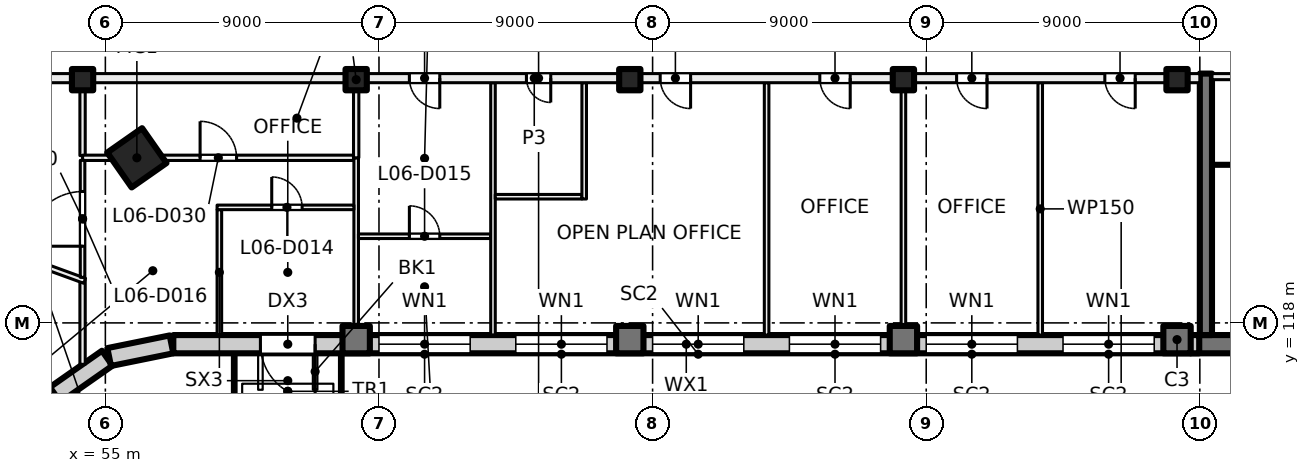
"""IFC4 building model, lengths in metres.
Left out: names, types, materials, properties, quantities, classifications, styles, units other than length and angle.
Written with IfcOpenShell. Run it as: python <this file> out.ifc"""

import sys

from ifc_helpers import new_model, si_unit, direction, frame, frame_2d, origin, origin_2d, place, context, subcontext, project, spatial, rectangle, hollow_rectangle, extrude, element, fill, save


model = new_model("IFC4")
c1 = context("Model", 3, precision=1e-05, world=origin(), true_north=direction((0.0, 1.0)))
c2 = subcontext(c1, "Body", "Model", "MODEL_VIEW")
j1 = project(units=[si_unit("LENGTHUNIT", "METRE"), si_unit("PLANEANGLEUNIT", "RADIAN")], contexts=[c1])
p1 = place(None, origin())
s1 = spatial("IfcSite", under=j1, at=p1, CompositionType="ELEMENT")
p2 = place(p1, origin())
s2 = spatial("IfcBuilding", under=s1, at=p2, CompositionType="ELEMENT")
p3 = place(p2, frame((0.0, 0.0, 31.5)))
s3 = spatial("IfcBuildingStorey", under=s2, at=p3, CompositionType="ELEMENT", Elevation=31.5)
p4 = place(p3, frame((56.036, 123.43, 0.0), z_axis=(0.0, 0.0, 1.0), x_axis=(0.573576436351, -0.819152044289, 0.0)))
e1 = element("IfcColumn", 1, at=p4, inside=s3, PredefinedType="COLUMN", context=c2, shape_type="SweptSolid", body=[
    extrude(hollow_rectangle(XDim=1.4, YDim=1.4, WallThickness=0.04, at=origin_2d()), origin(), (0.0, 0.0, 1.0), 4.0),
])
for number, where, z_axis, x_axis in (
    (2, (54.25, 126.0, 0.0), (0.0, 0.0, 1.0), (1.0, 0.0, 0.0)),
    (3, (63.25, 126.0, 0.0), (0.0, 0.0, 1.0), (1.0, 0.0, 0.0)),
    (4, (72.25, 126.0, 0.0), (0.0, 0.0, 1.0), (1.0, 0.0, 0.0)),
    (5, (81.25, 126.0, 0.0), (0.0, 0.0, 1.0), (1.0, 0.0, 0.0)),
    (6, (90.25, 126.0, 0.0), (0.0, 0.0, 1.0), (1.0, 0.0, 0.0)),
):
    element("IfcColumn", number, at=place(p3, frame(where, z_axis=z_axis, x_axis=x_axis)), inside=s3, PredefinedType="COLUMN", context=c2, shape_type="SweptSolid", body=[
        extrude(rectangle(XDim=0.7, YDim=0.7, at=origin_2d()), origin(), (0.0, 0.0, 1.0), 4.0),
    ])
for number, where, z_axis, x_axis in (
    (7, (63.25, 117.45, 0.0), (0.0, 0.0, 1.0), (1.0, 0.0, 0.0)),
    (8, (72.25, 117.45, 0.0), (0.0, 0.0, 1.0), (1.0, 0.0, 0.0)),
    (9, (81.25, 117.45, 0.0), (0.0, 0.0, 1.0), (1.0, 0.0, 0.0)),
    (10, (90.25, 117.45, 0.0), (0.0, 0.0, 1.0), (1.0, 0.0, 0.0)),
):
    element("IfcColumn", number, at=place(p3, frame(where, z_axis=z_axis, x_axis=x_axis)), inside=s3, PredefinedType="COLUMN", context=c2, shape_type="SweptSolid", body=[
        extrude(rectangle(XDim=0.9, YDim=0.9, at=origin_2d()), origin(), (0.0, 0.0, 1.0), 4.0),
    ])
p5 = place(p3, frame((99.6, 117.3, 0.0), z_axis=(0.0, 0.0, 1.0), x_axis=(-1.0, 0.0, 0.0)))
e11 = element("IfcWall", 11, at=p5, inside=s3, PredefinedType="SHEAR", context=c2, shape_type="SweptSolid", body=[
    extrude(rectangle(XDim=8.9, YDim=0.6, at=frame_2d((4.45, 0.0))), origin(), (0.0, 0.0, 1.0), 4.0),
])
p6 = place(p3, frame((91.2, 126.2, 0.0), z_axis=(0.0, 0.0, 1.0), x_axis=(0.0, -1.0, 0.0)))
e12 = element("IfcWall", 12, at=p6, inside=s3, PredefinedType="SHEAR", context=c2, shape_type="SweptSolid", body=[
    extrude(rectangle(XDim=8.6, YDim=0.4, at=frame_2d((4.3, 0.0))), origin(), (0.0, 0.0, 1.0), 4.0),
])
p7 = place(p3, frame((53.305, 115.578, 0.0), z_axis=(0.0, 0.0, 1.0), x_axis=(-0.522402266438, -0.852699168535, 0.0)))
e13 = element("IfcWall", 13, at=p7, inside=s3, PredefinedType="SOLIDWALL", context=c2, shape_type="SweptSolid", body=[
    extrude(rectangle(XDim=2.042, YDim=0.6, at=frame_2d((1.021, 0.0))), origin(), (0.0, 0.0, 1.0), 3.625),
])
for number, where, z_axis, x_axis in (
    (14, (55.062, 116.839, 0.0), (0.0, 0.0, 1.0), (-0.819, -0.574, 0.0)),
    (15, (57.175, 117.294, 0.0), (0.0, 0.0, 1.0), (-0.98, -0.199, 0.0)),
):
    element("IfcWall", number, at=place(p3, frame(where, z_axis=z_axis, x_axis=x_axis)), inside=s3, PredefinedType="SOLIDWALL", context=c2, shape_type="SweptSolid", body=[
        extrude(rectangle(XDim=2.092, YDim=0.6, at=frame_2d((1.046, 0.0))), origin(), (0.0, 0.0, 1.0), 3.625),
    ])
p8 = place(p3, frame((90.98, 117.3, 0.0), z_axis=(0.0, 0.0, 1.0), x_axis=(-1.0, 0.0, 0.0)))
e16 = element("IfcWall", 16, at=p8, inside=s3, PredefinedType="SOLIDWALL", context=c2, shape_type="SweptSolid", body=[
    extrude(rectangle(XDim=33.745, YDim=0.6, at=frame_2d((16.873, 0.0))), origin(), (0.0, 0.0, 1.0), 3.625),
])
p9 = place(p8, frame((1.48, 0.0, 0.9)))
e17 = element("IfcOpeningElement", 17, at=p9, cuts=e16, PredefinedType="OPENING", context=c2, shape_type="SweptSolid", body=[
    extrude(rectangle(XDim=3.0, YDim=2.4, at=frame_2d((1.5, 1.2))), frame((0.0, 0.31, 0.0), z_axis=(0.0, -1.0, 0.0), x_axis=(1.0, 0.0, 0.0)), (0.0, 0.0, 1.0), 0.62),
])
p10 = place(p8, frame((5.98, 0.0, 0.9)))
e18 = element("IfcOpeningElement", 18, at=p10, cuts=e16, PredefinedType="OPENING", context=c2, shape_type="SweptSolid", body=[
    extrude(rectangle(XDim=3.0, YDim=2.4, at=frame_2d((1.5, 1.2))), frame((0.0, 0.31, 0.0), z_axis=(0.0, -1.0, 0.0), x_axis=(1.0, 0.0, 0.0)), (0.0, 0.0, 1.0), 0.62),
])
p11 = place(p8, frame((10.48, 0.0, 0.9)))
e19 = element("IfcOpeningElement", 19, at=p11, cuts=e16, PredefinedType="OPENING", context=c2, shape_type="SweptSolid", body=[
    extrude(rectangle(XDim=3.0, YDim=2.4, at=frame_2d((1.5, 1.2))), frame((0.0, 0.31, 0.0), z_axis=(0.0, -1.0, 0.0), x_axis=(1.0, 0.0, 0.0)), (0.0, 0.0, 1.0), 0.62),
])
p12 = place(p8, frame((14.98, 0.0, 0.9)))
e20 = element("IfcOpeningElement", 20, at=p12, cuts=e16, PredefinedType="OPENING", context=c2, shape_type="SweptSolid", body=[
    extrude(rectangle(XDim=3.0, YDim=2.4, at=frame_2d((1.5, 1.2))), frame((0.0, 0.31, 0.0), z_axis=(0.0, -1.0, 0.0), x_axis=(1.0, 0.0, 0.0)), (0.0, 0.0, 1.0), 0.62),
])
p13 = place(p8, frame((19.48, 0.0, 0.9)))
e21 = element("IfcOpeningElement", 21, at=p13, cuts=e16, PredefinedType="OPENING", context=c2, shape_type="SweptSolid", body=[
    extrude(rectangle(XDim=3.0, YDim=2.4, at=frame_2d((1.5, 1.2))), frame((0.0, 0.31, 0.0), z_axis=(0.0, -1.0, 0.0), x_axis=(1.0, 0.0, 0.0)), (0.0, 0.0, 1.0), 0.62),
])
p14 = place(p8, frame((23.98, 0.0, 0.9)))
e22 = element("IfcOpeningElement", 22, at=p14, cuts=e16, PredefinedType="OPENING", context=c2, shape_type="SweptSolid", body=[
    extrude(rectangle(XDim=3.0, YDim=2.4, at=frame_2d((1.5, 1.2))), frame((0.0, 0.31, 0.0), z_axis=(0.0, -1.0, 0.0), x_axis=(1.0, 0.0, 0.0)), (0.0, 0.0, 1.0), 0.62),
])
p15 = place(p8, frame((29.08, 0.0, 0.0)))
e23 = element("IfcOpeningElement", 23, at=p15, cuts=e16, PredefinedType="OPENING", context=c2, shape_type="SweptSolid", body=[
    extrude(rectangle(XDim=1.8, YDim=2.4, at=frame_2d((0.9, 1.2))), frame((0.0, 0.31, 0.0), z_axis=(0.0, -1.0, 0.0), x_axis=(1.0, 0.0, 0.0)), (0.0, 0.0, 1.0), 0.62),
])
p16 = place(p3, frame((95.2, 126.1, 0.0), z_axis=(0.0, 0.0, 1.0), x_axis=(-1.0, 0.0, 0.0)))
e24 = element("IfcWall", 24, at=p16, inside=s3, PredefinedType="PARTITIONING", context=c2, shape_type="SweptSolid", body=[
    extrude(rectangle(XDim=3.8, YDim=0.2, at=frame_2d((1.9, 0.0))), origin(), (0.0, 0.0, 1.0), 3.625),
])
p17 = place(p16, frame((0.3, 0.0, 0.0)))
e25 = element("IfcOpeningElement", 25, at=p17, cuts=e24, PredefinedType="OPENING", context=c2, shape_type="SweptSolid", body=[
    extrude(rectangle(XDim=1.2, YDim=2.1, at=frame_2d((0.6, 1.05))), frame((0.0, 0.11, 0.0), z_axis=(0.0, -1.0, 0.0), x_axis=(1.0, 0.0, 0.0)), (0.0, 0.0, 1.0), 0.22),
])
p18 = place(p3, frame((93.35, 123.2, 0.0), z_axis=(0.0, 0.0, 1.0), x_axis=(-1.0, 0.0, 0.0)))
e26 = element("IfcWall", 26, at=p18, inside=s3, PredefinedType="PARTITIONING", context=c2, shape_type="SweptSolid", body=[
    extrude(rectangle(XDim=1.95, YDim=0.1, at=frame_2d((0.975, 0.0))), origin(), (0.0, 0.0, 1.0), 3.625),
])
p19 = place(p3, frame((54.25, 116.637, 0.0), z_axis=(0.0, 0.0, 1.0), x_axis=(0.0, 1.0, 0.0)))
e27 = element("IfcWall", 27, at=p19, inside=s3, PredefinedType="PARTITIONING", context=c2, shape_type="SweptSolid", body=[
    extrude(rectangle(XDim=2.776, YDim=0.175, at=frame_2d((1.388, 0.0))), origin(), (0.0, 0.0, 1.0), 3.625),
])
p20 = place(p3, frame((54.32, 119.384, 0.0), z_axis=(0.0, 0.0, 1.0), x_axis=(-0.939632908118, 0.342184157994, 0.0)))
e28 = element("IfcWall", 28, at=p20, inside=s3, PredefinedType="PARTITIONING", context=c2, shape_type="SweptSolid", body=[
    extrude(rectangle(XDim=8.665, YDim=0.175, at=frame_2d((4.333, 0.0))), origin(), (0.0, 0.0, 1.0), 3.625),
])
p21 = place(p3, frame((54.25, 123.502, 0.0), z_axis=(0.0, 0.0, 1.0), x_axis=(0.0, 1.0, 0.0)))
e29 = element("IfcWall", 29, at=p21, inside=s3, PredefinedType="PARTITIONING", context=c2, shape_type="SweptSolid", body=[
    extrude(rectangle(XDim=2.398, YDim=0.175, at=frame_2d((1.199, 0.0))), origin(), (0.0, 0.0, 1.0), 3.625),
])
p22 = place(p3, frame((54.25, 123.43, 0.0), z_axis=(0.0, 0.0, 1.0), x_axis=(1.0, 0.0, 0.0)))
e30 = element("IfcWall", 30, at=p22, inside=s3, PredefinedType="PARTITIONING", context=c2, shape_type="SweptSolid", body=[
    extrude(rectangle(XDim=8.912, YDim=0.175, at=frame_2d((4.456, 0.0))), origin(), (0.0, 0.0, 1.0), 3.625),
])
p23 = place(p22, frame((3.866, 0.0, 0.0)))
e31 = element("IfcOpeningElement", 31, at=p23, cuts=e30, PredefinedType="OPENING", context=c2, shape_type="SweptSolid", body=[
    extrude(rectangle(XDim=1.2, YDim=2.1, at=frame_2d((0.6, 1.05))), frame((0.0, 0.097, 0.0), z_axis=(0.0, -1.0, 0.0), x_axis=(1.0, 0.0, 0.0)), (0.0, 0.0, 1.0), 0.195),
])
p24 = place(p3, frame((54.25, 119.498, 0.0), z_axis=(0.0, 0.0, 1.0), x_axis=(0.0, 1.0, 0.0)))
e32 = element("IfcWall", 32, at=p24, inside=s3, PredefinedType="PARTITIONING", context=c2, shape_type="SweptSolid", body=[
    extrude(rectangle(XDim=3.848, YDim=0.15, at=frame_2d((1.924, 0.0))), origin(), (0.0, 0.0, 1.0), 3.625),
])
p25 = place(p24, frame((1.024, 0.0, 0.0)))
e33 = element("IfcOpeningElement", 33, at=p25, cuts=e32, PredefinedType="OPENING", context=c2, shape_type="SweptSolid", body=[
    extrude(rectangle(XDim=1.8, YDim=2.1, at=frame_2d((0.9, 1.05))), frame((0.0, 0.085, 0.0), z_axis=(0.0, -1.0, 0.0), x_axis=(1.0, 0.0, 0.0)), (0.0, 0.0, 1.0), 0.17),
])
p26 = place(p3, frame((58.75, 117.6, 0.0), z_axis=(0.0, 0.0, 1.0), x_axis=(0.0, 1.0, 0.0)))
e34 = element("IfcWall", 34, at=p26, inside=s3, PredefinedType="PARTITIONING", context=c2, shape_type="SweptSolid", body=[
    extrude(rectangle(XDim=4.125, YDim=0.15, at=frame_2d((2.062, 0.0))), origin(), (0.0, 0.0, 1.0), 3.625),
])
p27 = place(p3, frame((63.25, 117.6, 0.0), z_axis=(0.0, 0.0, 1.0), x_axis=(0.0, 1.0, 0.0)))
e35 = element("IfcWall", 35, at=p27, inside=s3, PredefinedType="PARTITIONING", context=c2, shape_type="SweptSolid", body=[
    extrude(rectangle(XDim=5.83, YDim=0.15, at=frame_2d((2.915, 0.0))), origin(), (0.0, 0.0, 1.0), 3.625),
])
p28 = place(p3, frame((63.325, 120.85, 0.0), z_axis=(0.0, 0.0, 1.0), x_axis=(1.0, 0.0, 0.0)))
e36 = element("IfcWall", 36, at=p28, inside=s3, PredefinedType="PARTITIONING", context=c2, shape_type="SweptSolid", body=[
    extrude(rectangle(XDim=4.35, YDim=0.15, at=frame_2d((2.175, 0.0))), origin(), (0.0, 0.0, 1.0), 3.625),
])
p29 = place(p28, frame((1.675, 0.0, 0.0)))
e37 = element("IfcOpeningElement", 37, at=p29, cuts=e36, PredefinedType="OPENING", context=c2, shape_type="SweptSolid", body=[
    extrude(rectangle(XDim=1.0, YDim=2.1, at=frame_2d((0.5, 1.05))), frame((0.0, 0.085, 0.0), z_axis=(0.0, -1.0, 0.0), x_axis=(1.0, 0.0, 0.0)), (0.0, 0.0, 1.0), 0.17),
])
p30 = place(p3, frame((58.675, 121.8, 0.0), z_axis=(0.0, 0.0, 1.0), x_axis=(1.0, 0.0, 0.0)))
e38 = element("IfcWall", 38, at=p30, inside=s3, PredefinedType="PARTITIONING", context=c2, shape_type="SweptSolid", body=[
    extrude(rectangle(XDim=4.5, YDim=0.15, at=frame_2d((2.25, 0.0))), origin(), (0.0, 0.0, 1.0), 3.625),
])
p31 = place(p30, frame((1.798, 0.0, 0.0)))
e39 = element("IfcOpeningElement", 39, at=p31, cuts=e38, PredefinedType="OPENING", context=c2, shape_type="SweptSolid", body=[
    extrude(rectangle(XDim=1.0, YDim=2.1, at=frame_2d((0.5, 1.05))), frame((0.0, 0.085, 0.0), z_axis=(0.0, -1.0, 0.0), x_axis=(1.0, 0.0, 0.0)), (0.0, 0.0, 1.0), 0.17),
])
p32 = place(p3, frame((63.25, 123.43, 0.0), z_axis=(0.0, 0.0, 1.0), x_axis=(0.0, 1.0, 0.0)))
e40 = element("IfcWall", 40, at=p32, inside=s3, PredefinedType="PARTITIONING", context=c2, shape_type="SweptSolid", body=[
    extrude(rectangle(XDim=2.47, YDim=0.175, at=frame_2d((1.235, 0.0))), origin(), (0.0, 0.0, 1.0), 3.625),
])
p33 = place(p3, frame((67.75, 117.6, 0.0), z_axis=(0.0, 0.0, 1.0), x_axis=(0.0, 1.0, 0.0)))
e41 = element("IfcWall", 41, at=p33, inside=s3, PredefinedType="PARTITIONING", context=c2, shape_type="SweptSolid", body=[
    extrude(rectangle(XDim=8.3, YDim=0.15, at=frame_2d((4.15, 0.0))), origin(), (0.0, 0.0, 1.0), 3.625),
])
p34 = place(p3, frame((70.675, 122.15, 0.0), z_axis=(0.0, 0.0, 1.0), x_axis=(-1.0, 0.0, 0.0)))
e42 = element("IfcWall", 42, at=p34, inside=s3, PredefinedType="PARTITIONING", context=c2, shape_type="SweptSolid", body=[
    extrude(rectangle(XDim=2.85, YDim=0.15, at=frame_2d((1.425, 0.0))), origin(), (0.0, 0.0, 1.0), 3.625),
])
p35 = place(p3, frame((70.75, 125.9, 0.0), z_axis=(0.0, 0.0, 1.0), x_axis=(0.0, -1.0, 0.0)))
e43 = element("IfcWall", 43, at=p35, inside=s3, PredefinedType="PARTITIONING", context=c2, shape_type="SweptSolid", body=[
    extrude(rectangle(XDim=3.825, YDim=0.15, at=frame_2d((1.913, 0.0))), origin(), (0.0, 0.0, 1.0), 3.625),
])
for number, where, z_axis, x_axis in (
    (44, (76.75, 117.6, 0.0), (0.0, 0.0, 1.0), (0.0, 1.0, 0.0)),
    (45, (81.25, 117.6, 0.0), (0.0, 0.0, 1.0), (0.0, 1.0, 0.0)),
    (46, (85.75, 117.6, 0.0), (0.0, 0.0, 1.0), (0.0, 1.0, 0.0)),
):
    element("IfcWall", number, at=place(p3, frame(where, z_axis=z_axis, x_axis=x_axis)), inside=s3, PredefinedType="PARTITIONING", context=c2, shape_type="SweptSolid", body=[
        extrude(rectangle(XDim=8.3, YDim=0.15, at=frame_2d((4.15, 0.0))), origin(), (0.0, 0.0, 1.0), 3.625),
    ])
p36 = place(p3, frame((91.0, 126.05, 0.0), z_axis=(0.0, 0.0, 1.0), x_axis=(-1.0, 0.0, 0.0)))
e47 = element("IfcWall", 47, at=p36, inside=s3, PredefinedType="PARTITIONING", context=c2, shape_type="SweptSolid", body=[
    extrude(rectangle(XDim=43.785, YDim=0.3, at=frame_2d((21.893, 0.0))), origin(), (0.0, 0.0, 1.0), 3.625),
])
p37 = place(p36, frame((2.125, 0.0, 0.0)))
e48 = element("IfcOpeningElement", 48, at=p37, cuts=e47, PredefinedType="OPENING", context=c2, shape_type="SweptSolid", body=[
    extrude(rectangle(XDim=1.0, YDim=2.1, at=frame_2d((0.5, 1.05))), frame((0.0, 0.16, 0.0), z_axis=(0.0, -1.0, 0.0), x_axis=(1.0, 0.0, 0.0)), (0.0, 0.0, 1.0), 0.32),
])
p38 = place(p36, frame((7.0, 0.0, 0.0)))
e49 = element("IfcOpeningElement", 49, at=p38, cuts=e47, PredefinedType="OPENING", context=c2, shape_type="SweptSolid", body=[
    extrude(rectangle(XDim=1.0, YDim=2.1, at=frame_2d((0.5, 1.05))), frame((0.0, 0.16, 0.0), z_axis=(0.0, -1.0, 0.0), x_axis=(1.0, 0.0, 0.0)), (0.0, 0.0, 1.0), 0.32),
])
p39 = place(p36, frame((11.5, 0.0, 0.0)))
e50 = element("IfcOpeningElement", 50, at=p39, cuts=e47, PredefinedType="OPENING", context=c2, shape_type="SweptSolid", body=[
    extrude(rectangle(XDim=1.0, YDim=2.1, at=frame_2d((0.5, 1.05))), frame((0.0, 0.16, 0.0), z_axis=(0.0, -1.0, 0.0), x_axis=(1.0, 0.0, 0.0)), (0.0, 0.0, 1.0), 0.32),
])
p40 = place(p36, frame((21.35, 0.0, 0.0)))
e51 = element("IfcOpeningElement", 51, at=p40, cuts=e47, PredefinedType="OPENING", context=c2, shape_type="SweptSolid", body=[
    extrude(rectangle(XDim=0.8, YDim=2.1, at=frame_2d((0.4, 1.05))), frame((0.0, 0.16, 0.0), z_axis=(0.0, -1.0, 0.0), x_axis=(1.0, 0.0, 0.0)), (0.0, 0.0, 1.0), 0.32),
])
p41 = place(p36, frame((16.75, 0.0, 0.0)))
e52 = element("IfcOpeningElement", 52, at=p41, cuts=e47, PredefinedType="OPENING", context=c2, shape_type="SweptSolid", body=[
    extrude(rectangle(XDim=1.0, YDim=2.1, at=frame_2d((0.5, 1.05))), frame((0.0, 0.16, 0.0), z_axis=(0.0, -1.0, 0.0), x_axis=(1.0, 0.0, 0.0)), (0.0, 0.0, 1.0), 0.32),
])
p42 = place(p36, frame((25.0, 0.0, 0.0)))
e53 = element("IfcOpeningElement", 53, at=p42, cuts=e47, PredefinedType="OPENING", context=c2, shape_type="SweptSolid", body=[
    extrude(rectangle(XDim=1.0, YDim=2.1, at=frame_2d((0.5, 1.05))), frame((0.0, 0.16, 0.0), z_axis=(0.0, -1.0, 0.0), x_axis=(1.0, 0.0, 0.0)), (0.0, 0.0, 1.0), 0.32),
])
p43 = place(p36, frame((39.296, 0.0, 0.0)))
e54 = element("IfcOpeningElement", 54, at=p43, cuts=e47, PredefinedType="OPENING", context=c2, shape_type="SweptSolid", body=[
    extrude(rectangle(XDim=1.8, YDim=2.1, at=frame_2d((0.9, 1.05))), frame((0.0, 0.16, 0.0), z_axis=(0.0, -1.0, 0.0), x_axis=(1.0, 0.0, 0.0)), (0.0, 0.0, 1.0), 0.32),
])
p44 = place(p9, origin())
e55 = element("IfcWindow", 55, at=p44, inside=s3, PartitioningType="SINGLE_PANEL", PredefinedType="WINDOW", context=c2, shape_type="SweptSolid", body=[
    extrude(rectangle(XDim=3.0, YDim=2.4, at=frame_2d((1.5, 1.2))), frame((0.0, 0.03, 0.0), z_axis=(0.0, -1.0, 0.0), x_axis=(1.0, 0.0, 0.0)), (0.0, 0.0, 1.0), 0.06),
])
fill(e17, e55)
p45 = place(p10, origin())
e56 = element("IfcWindow", 56, at=p45, inside=s3, PartitioningType="SINGLE_PANEL", PredefinedType="WINDOW", context=c2, shape_type="SweptSolid", body=[
    extrude(rectangle(XDim=3.0, YDim=2.4, at=frame_2d((1.5, 1.2))), frame((0.0, 0.03, 0.0), z_axis=(0.0, -1.0, 0.0), x_axis=(1.0, 0.0, 0.0)), (0.0, 0.0, 1.0), 0.06),
])
fill(e18, e56)
p46 = place(p11, origin())
e57 = element("IfcWindow", 57, at=p46, inside=s3, PartitioningType="SINGLE_PANEL", PredefinedType="WINDOW", context=c2, shape_type="SweptSolid", body=[
    extrude(rectangle(XDim=3.0, YDim=2.4, at=frame_2d((1.5, 1.2))), frame((0.0, 0.03, 0.0), z_axis=(0.0, -1.0, 0.0), x_axis=(1.0, 0.0, 0.0)), (0.0, 0.0, 1.0), 0.06),
])
fill(e19, e57)
p47 = place(p12, origin())
e58 = element("IfcWindow", 58, at=p47, inside=s3, PartitioningType="SINGLE_PANEL", PredefinedType="WINDOW", context=c2, shape_type="SweptSolid", body=[
    extrude(rectangle(XDim=3.0, YDim=2.4, at=frame_2d((1.5, 1.2))), frame((0.0, 0.03, 0.0), z_axis=(0.0, -1.0, 0.0), x_axis=(1.0, 0.0, 0.0)), (0.0, 0.0, 1.0), 0.06),
])
fill(e20, e58)
p48 = place(p13, origin())
e59 = element("IfcWindow", 59, at=p48, inside=s3, PartitioningType="SINGLE_PANEL", PredefinedType="WINDOW", context=c2, shape_type="SweptSolid", body=[
    extrude(rectangle(XDim=3.0, YDim=2.4, at=frame_2d((1.5, 1.2))), frame((0.0, 0.03, 0.0), z_axis=(0.0, -1.0, 0.0), x_axis=(1.0, 0.0, 0.0)), (0.0, 0.0, 1.0), 0.06),
])
fill(e21, e59)
p49 = place(p14, origin())
e60 = element("IfcWindow", 60, at=p49, inside=s3, PartitioningType="SINGLE_PANEL", PredefinedType="WINDOW", context=c2, shape_type="SweptSolid", body=[
    extrude(rectangle(XDim=3.0, YDim=2.4, at=frame_2d((1.5, 1.2))), frame((0.0, 0.03, 0.0), z_axis=(0.0, -1.0, 0.0), x_axis=(1.0, 0.0, 0.0)), (0.0, 0.0, 1.0), 0.06),
])
fill(e22, e60)
p50 = place(p15, origin())
e61 = element("IfcDoor", 61, at=p50, inside=s3, OperationType="DOUBLE_DOOR_SINGLE_SWING", PredefinedType="DOOR", context=c2, shape_type="SweptSolid", body=[
    extrude(rectangle(XDim=1.8, YDim=2.4, at=frame_2d((0.9, 1.2))), frame((0.0, 0.025, 0.0), z_axis=(0.0, -1.0, 0.0), x_axis=(1.0, 0.0, 0.0)), (0.0, 0.0, 1.0), 0.05),
])
fill(e23, e61)
p51 = place(p37, origin())
e62 = element("IfcDoor", 62, at=p51, inside=s3, OperationType="SINGLE_SWING_LEFT", PredefinedType="DOOR", context=c2, shape_type="SweptSolid", body=[
    extrude(rectangle(XDim=1.0, YDim=2.1, at=frame_2d((0.5, 1.05))), frame((0.0, 0.025, 0.0), z_axis=(0.0, -1.0, 0.0), x_axis=(1.0, 0.0, 0.0)), (0.0, 0.0, 1.0), 0.05),
])
fill(e48, e62)
p52 = place(p38, origin())
e63 = element("IfcDoor", 63, at=p52, inside=s3, OperationType="SINGLE_SWING_RIGHT", PredefinedType="DOOR", context=c2, shape_type="SweptSolid", body=[
    extrude(rectangle(XDim=1.0, YDim=2.1, at=frame_2d((0.5, 1.05))), frame((0.0, 0.025, 0.0), z_axis=(0.0, -1.0, 0.0), x_axis=(1.0, 0.0, 0.0)), (0.0, 0.0, 1.0), 0.05),
])
fill(e49, e63)
p53 = place(p39, origin())
e64 = element("IfcDoor", 64, at=p53, inside=s3, OperationType="SINGLE_SWING_LEFT", PredefinedType="DOOR", context=c2, shape_type="SweptSolid", body=[
    extrude(rectangle(XDim=1.0, YDim=2.1, at=frame_2d((0.5, 1.05))), frame((0.0, 0.025, 0.0), z_axis=(0.0, -1.0, 0.0), x_axis=(1.0, 0.0, 0.0)), (0.0, 0.0, 1.0), 0.05),
])
fill(e50, e64)
p54 = place(p40, origin())
e65 = element("IfcDoor", 65, at=p54, inside=s3, OperationType="SINGLE_SWING_LEFT", PredefinedType="DOOR", context=c2, shape_type="SweptSolid", body=[
    extrude(rectangle(XDim=0.8, YDim=2.1, at=frame_2d((0.4, 1.05))), frame((0.0, 0.025, 0.0), z_axis=(0.0, -1.0, 0.0), x_axis=(1.0, 0.0, 0.0)), (0.0, 0.0, 1.0), 0.05),
])
fill(e51, e65)
p55 = place(p41, origin())
e66 = element("IfcDoor", 66, at=p55, inside=s3, OperationType="SINGLE_SWING_LEFT", PredefinedType="DOOR", context=c2, shape_type="SweptSolid", body=[
    extrude(rectangle(XDim=1.0, YDim=2.1, at=frame_2d((0.5, 1.05))), frame((0.0, 0.025, 0.0), z_axis=(0.0, -1.0, 0.0), x_axis=(1.0, 0.0, 0.0)), (0.0, 0.0, 1.0), 0.05),
])
fill(e52, e66)
p56 = place(p42, origin())
e67 = element("IfcDoor", 67, at=p56, inside=s3, OperationType="SINGLE_SWING_LEFT", PredefinedType="DOOR", context=c2, shape_type="SweptSolid", body=[
    extrude(rectangle(XDim=1.0, YDim=2.1, at=frame_2d((0.5, 1.05))), frame((0.0, 0.025, 0.0), z_axis=(0.0, -1.0, 0.0), x_axis=(1.0, 0.0, 0.0)), (0.0, 0.0, 1.0), 0.05),
])
fill(e53, e67)
p57 = place(p31, origin())
e68 = element("IfcDoor", 68, at=p57, inside=s3, OperationType="SINGLE_SWING_LEFT", PredefinedType="DOOR", context=c2, shape_type="SweptSolid", body=[
    extrude(rectangle(XDim=1.0, YDim=2.1, at=frame_2d((0.5, 1.05))), frame((0.0, 0.025, 0.0), z_axis=(0.0, -1.0, 0.0), x_axis=(1.0, 0.0, 0.0)), (0.0, 0.0, 1.0), 0.05),
])
fill(e39, e68)
p58 = place(p29, origin())
e69 = element("IfcDoor", 69, at=p58, inside=s3, OperationType="SINGLE_SWING_LEFT", PredefinedType="DOOR", context=c2, shape_type="SweptSolid", body=[
    extrude(rectangle(XDim=1.0, YDim=2.1, at=frame_2d((0.5, 1.05))), frame((0.0, 0.025, 0.0), z_axis=(0.0, -1.0, 0.0), x_axis=(1.0, 0.0, 0.0)), (0.0, 0.0, 1.0), 0.05),
])
fill(e37, e69)
p59 = place(p25, origin())
e70 = element("IfcDoor", 70, at=p59, inside=s3, OperationType="DOUBLE_DOOR_SINGLE_SWING", PredefinedType="DOOR", context=c2, shape_type="SweptSolid", body=[
    extrude(rectangle(XDim=1.8, YDim=2.1, at=frame_2d((0.9, 1.05))), frame((0.0, 0.025, 0.0), z_axis=(0.0, -1.0, 0.0), x_axis=(1.0, 0.0, 0.0)), (0.0, 0.0, 1.0), 0.05),
])
fill(e33, e70)
p60 = place(p23, origin())
e71 = element("IfcDoor", 71, at=p60, inside=s3, OperationType="DOUBLE_DOOR_SINGLE_SWING", PredefinedType="DOOR", context=c2, shape_type="SweptSolid", body=[
    extrude(rectangle(XDim=1.2, YDim=2.1, at=frame_2d((0.6, 1.05))), frame((0.0, 0.025, 0.0), z_axis=(0.0, -1.0, 0.0), x_axis=(1.0, 0.0, 0.0)), (0.0, 0.0, 1.0), 0.05),
])
fill(e31, e71)
save(model, sys.argv[1])
